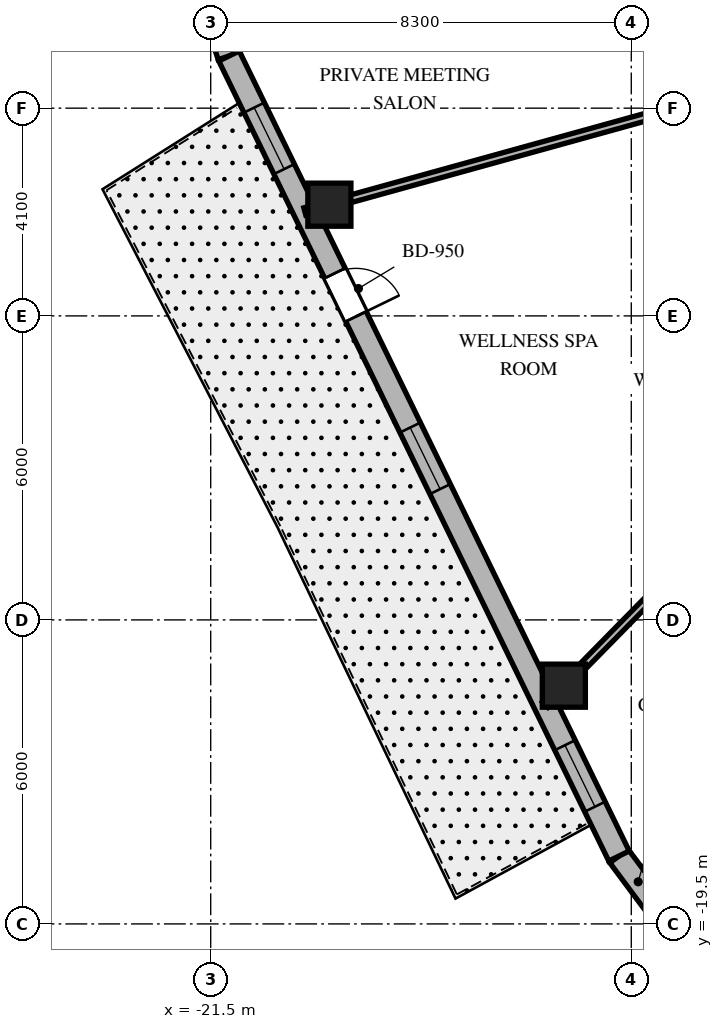
"""IFC4 building model, lengths in metres.
Left out: names, types, materials, properties, quantities, classifications, styles, units other than length and angle.
Written with IfcOpenShell. Run it as: python <this file> out.ifc"""

import sys

from ifc_helpers import new_model, si_unit, direction, frame, frame_2d, origin, origin_2d, place, context, subcontext, project, spatial, rectangle, extrude, element, fill, save


model = new_model("IFC4")
c1 = context("Model", 3, precision=1e-05, world=origin(), true_north=direction((0.0, 1.0)))
c2 = subcontext(c1, "Body", "Model", "MODEL_VIEW")
j1 = project(units=[si_unit("LENGTHUNIT", "METRE"), si_unit("PLANEANGLEUNIT", "RADIAN")], contexts=[c1])
p1 = place(None, origin())
s1 = spatial("IfcSite", under=j1, at=p1, CompositionType="ELEMENT")
p2 = place(p1, origin())
s2 = spatial("IfcBuilding", under=s1, at=p2, CompositionType="ELEMENT")
p3 = place(p2, frame((0.0, 0.0, 284.7)))
s3 = spatial("IfcBuildingStorey", under=s2, at=p3, CompositionType="ELEMENT", Elevation=284.7)
for number, where, z_axis, x_axis in (
    (1, (-19.158, -5.305, 0.0), (0.0, 0.0, 1.0), (1.0, 0.0, 0.0)),
    (2, (-14.531, -14.798, 0.0), (0.0, 0.0, 1.0), (1.0, 0.0, 0.0)),
):
    element("IfcColumn", number, at=place(p3, frame(where, z_axis=z_axis, x_axis=x_axis)), inside=s3, PredefinedType="COLUMN", context=c2, shape_type="SweptSolid", body=[
        extrude(rectangle(XDim=0.85, YDim=0.85, at=origin_2d()), origin(), (0.0, 0.0, 1.0), 3.9),
    ])
p4 = place(p3, frame((-13.443, -18.16, 0.0), z_axis=(0.0, 0.0, 1.0), x_axis=(0.597042425808, -0.802209661987, 0.0)))
e3 = element("IfcWall", 3, at=p4, inside=s3, PredefinedType="SOLIDWALL", context=c2, shape_type="SweptSolid", body=[
    extrude(rectangle(XDim=1.27, YDim=0.45, at=frame_2d((0.635, 0.0))), origin(), (0.0, 0.0, 1.0), 3.58),
])
p5 = place(p3, frame((-21.422, -1.522, 0.0), z_axis=(0.0, 0.0, 1.0), x_axis=(0.316964162323, -0.94843751497, 0.0)))
e4 = element("IfcWall", 4, at=p5, inside=s3, PredefinedType="SOLIDWALL", context=c2, shape_type="SweptSolid", body=[
    extrude(rectangle(XDim=0.895, YDim=0.45, at=frame_2d((0.448, 0.0))), origin(), (0.0, 0.0, 1.0), 3.58),
])
p6 = place(p3, frame((-21.138, -2.371, 0.0), z_axis=(0.0, 0.0, 1.0), x_axis=(0.438128124058, -0.89891253574, 0.0)))
e5 = element("IfcWall", 5, at=p6, inside=s3, PredefinedType="SOLIDWALL", context=c2, shape_type="SweptSolid", body=[
    extrude(rectangle(XDim=17.565, YDim=0.45, at=frame_2d((8.782, 0.0))), origin(), (0.0, 0.0, 1.0), 3.58),
])
p7 = place(p6, frame((4.769, 0.0, 0.0)))
e6 = element("IfcOpeningElement", 6, at=p7, cuts=e5, PredefinedType="OPENING", context=c2, shape_type="SweptSolid", body=[
    extrude(rectangle(XDim=0.95, YDim=2.15, at=frame_2d((0.475, 1.075))), frame((0.0, 0.235, 0.0), z_axis=(0.0, -1.0, 0.0), x_axis=(1.0, 0.0, 0.0)), (0.0, 0.0, 1.0), 0.47),
])
p8 = place(p6, frame((1.133, 0.0, 0.8)))
e7 = element("IfcOpeningElement", 7, at=p8, cuts=e5, PredefinedType="OPENING", context=c2, shape_type="SweptSolid", body=[
    extrude(rectangle(XDim=1.35, YDim=1.75, at=frame_2d((0.675, 0.875))), frame((0.0, 0.235, 0.0), z_axis=(0.0, -1.0, 0.0), x_axis=(1.0, 0.0, 0.0)), (0.0, 0.0, 1.0), 0.47),
])
p9 = place(p6, frame((8.158, 0.0, 0.8)))
e8 = element("IfcOpeningElement", 8, at=p9, cuts=e5, PredefinedType="OPENING", context=c2, shape_type="SweptSolid", body=[
    extrude(rectangle(XDim=1.35, YDim=1.75, at=frame_2d((0.675, 0.875))), frame((0.0, 0.235, 0.0), z_axis=(0.0, -1.0, 0.0), x_axis=(1.0, 0.0, 0.0)), (0.0, 0.0, 1.0), 0.47),
])
p10 = place(p6, frame((15.132, 0.0, 0.8)))
e9 = element("IfcOpeningElement", 9, at=p10, cuts=e5, PredefinedType="OPENING", context=c2, shape_type="SweptSolid", body=[
    extrude(rectangle(XDim=1.35, YDim=1.75, at=frame_2d((0.675, 0.875))), frame((0.0, 0.235, 0.0), z_axis=(0.0, -1.0, 0.0), x_axis=(1.0, 0.0, 0.0)), (0.0, 0.0, 1.0), 0.47),
])
p11 = place(p3, frame((-11.35, -3.143, 0.0), z_axis=(0.0, 0.0, 1.0), x_axis=(-0.963731818141, -0.266872596386, 0.0)))
e10 = element("IfcWall", 10, at=p11, inside=s3, PredefinedType="PARTITIONING", context=c2, shape_type="SweptSolid", body=[
    extrude(rectangle(XDim=8.605, YDim=0.15, at=frame_2d((4.302, 0.0))), origin(), (0.0, 0.0, 1.0), 2.92),
])
p12 = place(p3, frame((-9.672, -9.85, 0.0), z_axis=(0.0, 0.0, 1.0), x_axis=(-0.700629771301, -0.713524998558, 0.0)))
e11 = element("IfcWall", 11, at=p12, inside=s3, PredefinedType="PARTITIONING", context=c2, shape_type="SweptSolid", body=[
    extrude(rectangle(XDim=7.459, YDim=0.15, at=frame_2d((3.73, 0.0))), origin(), (0.0, 0.0, 1.0), 2.92),
])
p13 = place(p7, origin())
e12 = element("IfcDoor", 12, at=p13, inside=s3, OperationType="SINGLE_SWING_RIGHT", PredefinedType="DOOR", context=c2, shape_type="SweptSolid", body=[
    extrude(rectangle(XDim=0.95, YDim=2.15, at=frame_2d((0.475, 1.075))), frame((0.0, 0.025, 0.0), z_axis=(0.0, -1.0, 0.0), x_axis=(1.0, 0.0, 0.0)), (0.0, 0.0, 1.0), 0.05),
])
fill(e6, e12)
p14 = place(p8, origin())
e13 = element("IfcWindow", 13, at=p14, inside=s3, PartitioningType="SINGLE_PANEL", PredefinedType="WINDOW", context=c2, shape_type="SweptSolid", body=[
    extrude(rectangle(XDim=1.35, YDim=1.75, at=frame_2d((0.675, 0.875))), frame((0.0, 0.03, 0.0), z_axis=(0.0, -1.0, 0.0), x_axis=(1.0, 0.0, 0.0)), (0.0, 0.0, 1.0), 0.06),
])
fill(e7, e13)
p15 = place(p9, origin())
e14 = element("IfcWindow", 14, at=p15, inside=s3, PartitioningType="SINGLE_PANEL", PredefinedType="WINDOW", context=c2, shape_type="SweptSolid", body=[
    extrude(rectangle(XDim=1.35, YDim=1.75, at=frame_2d((0.675, 0.875))), frame((0.0, 0.03, 0.0), z_axis=(0.0, -1.0, 0.0), x_axis=(1.0, 0.0, 0.0)), (0.0, 0.0, 1.0), 0.06),
])
fill(e8, e14)
p16 = place(p10, origin())
e15 = element("IfcWindow", 15, at=p16, inside=s3, PartitioningType="SINGLE_PANEL", PredefinedType="WINDOW", context=c2, shape_type="SweptSolid", body=[
    extrude(rectangle(XDim=1.35, YDim=1.75, at=frame_2d((0.675, 0.875))), frame((0.0, 0.03, 0.0), z_axis=(0.0, -1.0, 0.0), x_axis=(1.0, 0.0, 0.0)), (0.0, 0.0, 1.0), 0.06),
])
fill(e9, e15)
save(model, sys.argv[1])
